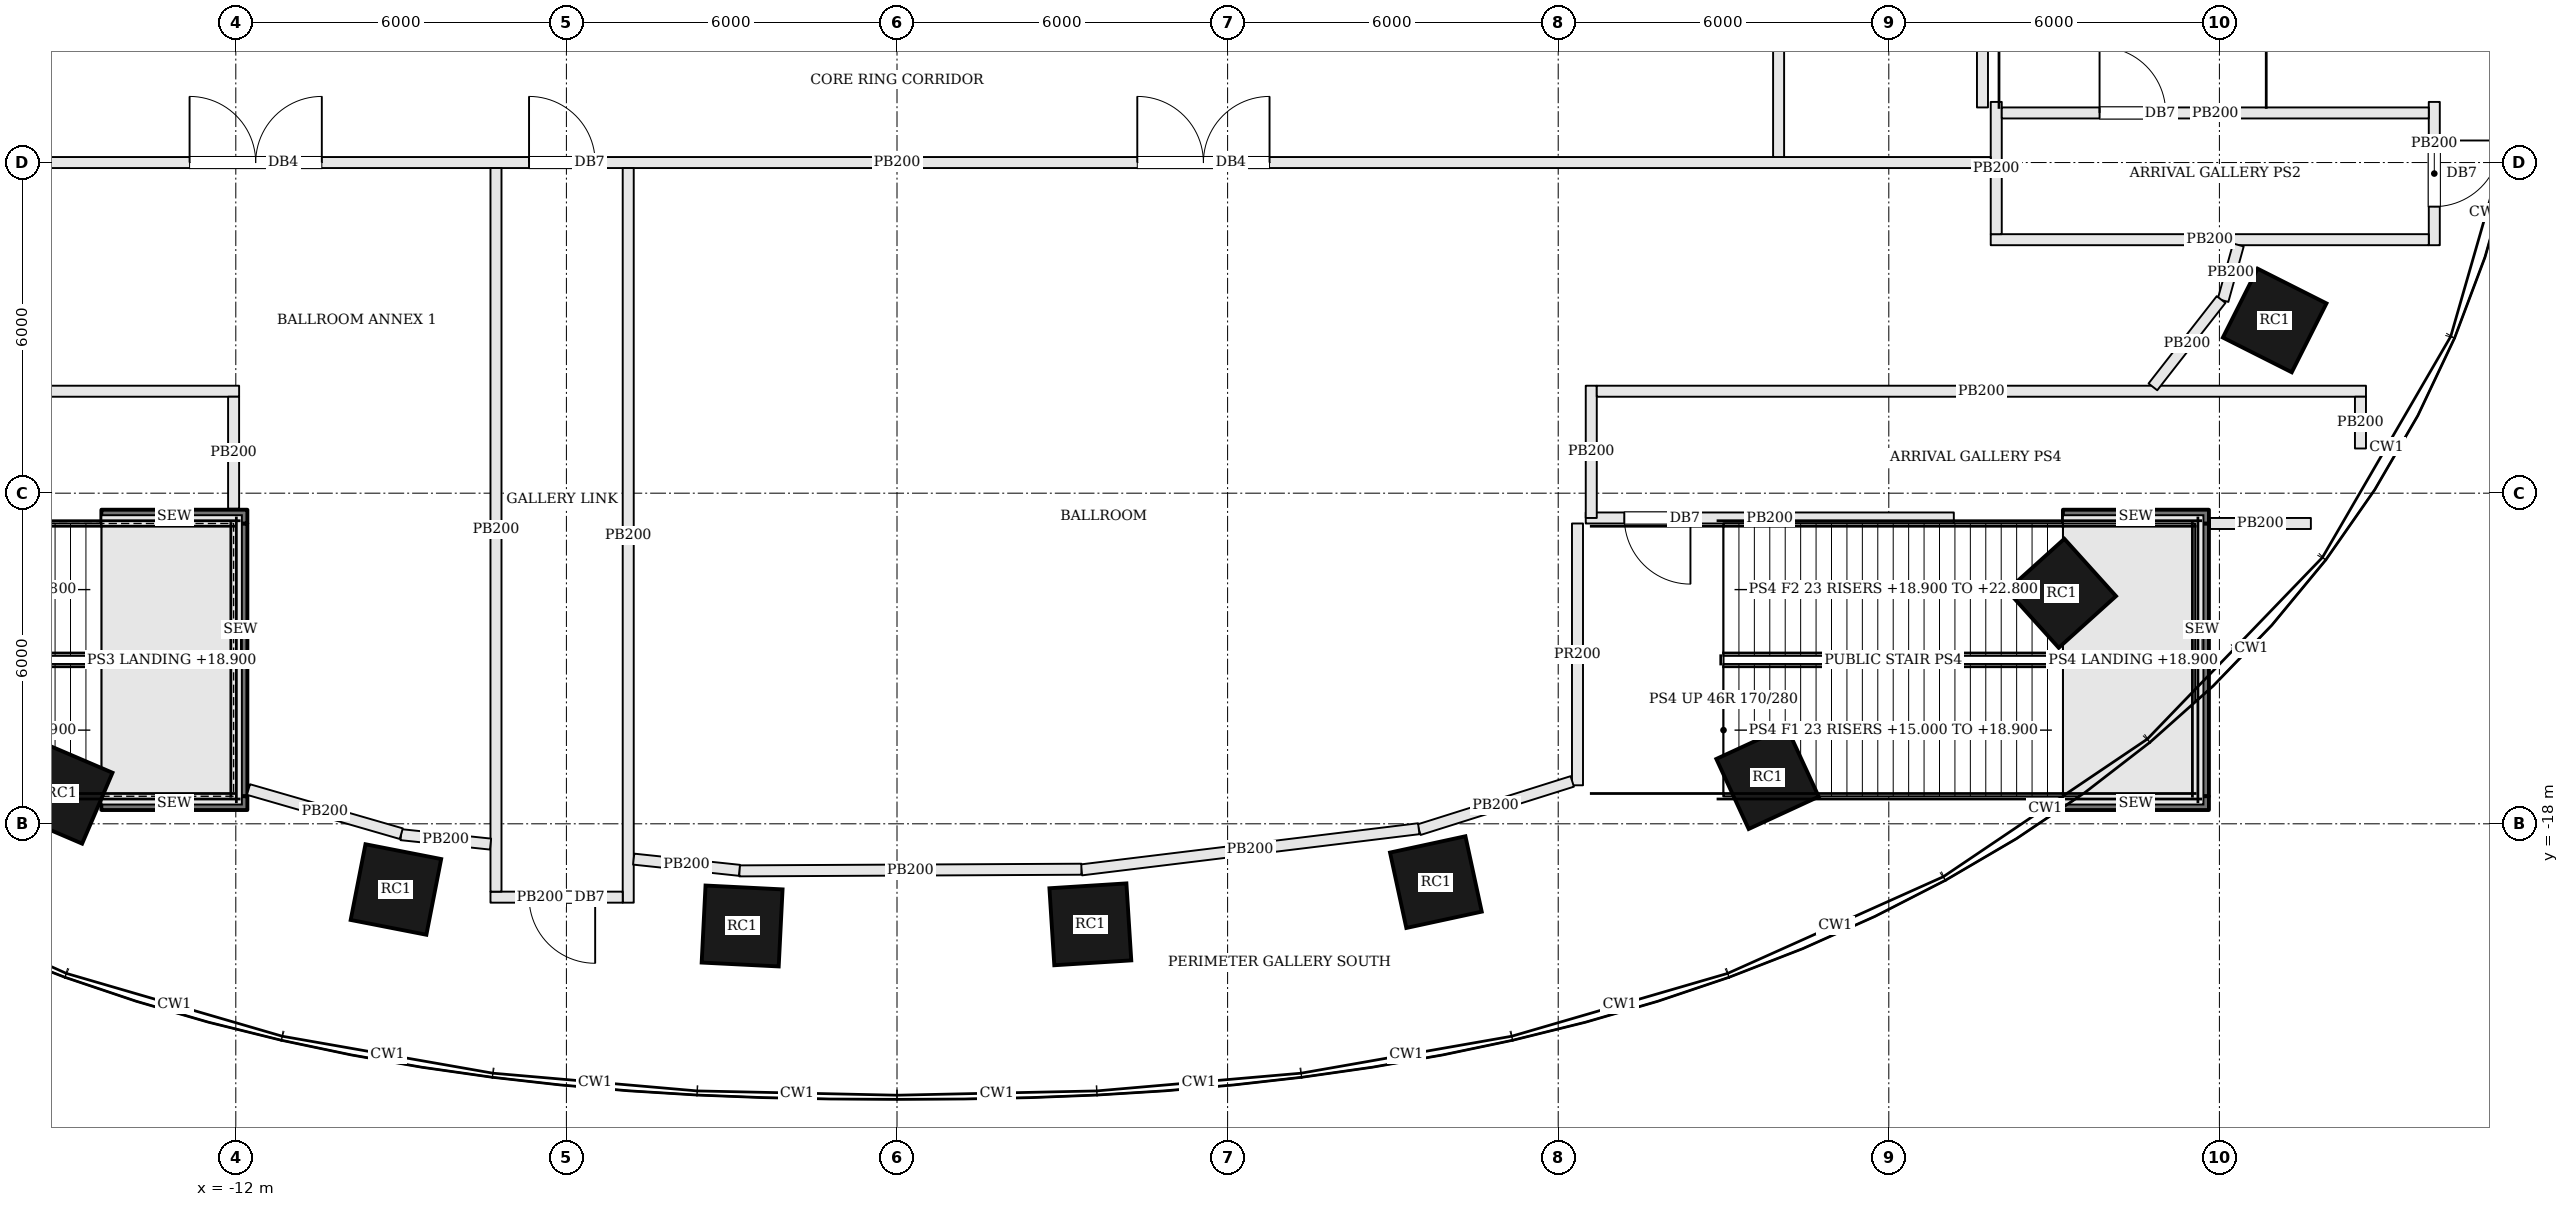
"""IFC4 building model, lengths in metres.
Left out: names, types, materials, properties, quantities, classifications, styles, units other than length and angle.
Written with IfcOpenShell. Run it as: python <this file> out.ifc"""

import sys

from ifc_helpers import new_model, si_unit, direction, frame, frame_2d, origin, origin_2d, place, context, subcontext, project, spatial, rectangle, extrude, element, fill, save


model = new_model("IFC4")
c1 = context("Model", 3, precision=1e-05, world=origin(), true_north=direction((0.0, 1.0)))
c2 = subcontext(c1, "Body", "Model", "MODEL_VIEW")
j1 = project(units=[si_unit("LENGTHUNIT", "METRE"), si_unit("PLANEANGLEUNIT", "RADIAN")], contexts=[c1])
p1 = place(None, origin())
s1 = spatial("IfcSite", under=j1, at=p1, CompositionType="ELEMENT")
p2 = place(p1, origin())
s2 = spatial("IfcBuilding", under=s1, at=p2, CompositionType="ELEMENT")
p3 = place(p2, frame((0.0, 0.0, 15.0)))
s3 = spatial("IfcBuildingStorey", under=s2, at=p3, CompositionType="ELEMENT", Elevation=15.0)
for number, where, z_axis, x_axis in (
    (1, (-15.157, -17.441, 0.0), (0.0, 0.0, 1.0), (0.919, -0.394, 0.0)),
    (2, (-9.094, -19.192, 0.0), (0.0, 0.0, 1.0), (0.981, -0.192, 0.0)),
    (3, (-2.811, -19.854, 0.0), (0.0, 0.0, 1.0), (0.999, -0.05, 0.0)),
    (4, (3.509, -19.824, 0.0), (0.0, 0.0, 1.0), (0.998, 0.063, 0.0)),
    (5, (9.78, -19.058, 0.0), (0.0, 0.0, 1.0), (0.977, 0.211, 0.0)),
    (6, (15.799, -17.165, 0.0), (0.0, 0.0, 1.0), (0.908, 0.419, 0.0)),
    (7, (21.135, -13.817, 0.0), (0.0, 0.0, 1.0), (0.743, 0.67, 0.0)),
    (8, (25.003, -8.866, 0.0), (0.0, 0.0, 1.0), (0.45, 0.893, 0.0)),
):
    element("IfcColumn", number, at=place(p3, frame(where, z_axis=z_axis, x_axis=x_axis)), inside=s3, PredefinedType="COLUMN", context=c2, shape_type="SweptSolid", body=[
        extrude(rectangle(XDim=1.4, YDim=1.4, at=origin_2d()), origin(), (0.0, 0.0, 1.0), 7.8),
    ])
p4 = place(p3, frame((27.9, -4.9, 0.0), z_axis=(0.0, 0.0, 1.0), x_axis=(0.0, -1.0, 0.0)))
e9 = element("IfcWall", 9, at=p4, inside=s3, PredefinedType="PARTITIONING", context=c2, shape_type="SweptSolid", body=[
    extrude(rectangle(XDim=2.6, YDim=0.2, at=frame_2d((1.3, 0.0))), origin(), (0.0, 0.0, 1.0), 6.83),
])
p5 = place(p4, frame((0.7, 0.0, 0.0)))
e10 = element("IfcOpeningElement", 10, at=p5, cuts=e9, PredefinedType="OPENING", context=c2, shape_type="SweptSolid", body=[
    extrude(rectangle(XDim=1.2, YDim=2.1, at=frame_2d((0.6, 1.05))), frame((0.0, 0.11, 0.0), z_axis=(0.0, -1.0, 0.0), x_axis=(1.0, 0.0, 0.0)), (0.0, 0.0, 1.0), 0.22),
])
p6 = place(p3, frame((27.8, -7.4, 0.0), z_axis=(0.0, 0.0, 1.0), x_axis=(-1.0, 0.0, 0.0)))
e11 = element("IfcWall", 11, at=p6, inside=s3, PredefinedType="PARTITIONING", context=c2, shape_type="SweptSolid", body=[
    extrude(rectangle(XDim=7.95, YDim=0.2, at=frame_2d((3.975, 0.0))), origin(), (0.0, 0.0, 1.0), 6.83),
])
p7 = place(p3, frame((19.95, -7.3, 0.0), z_axis=(0.0, 0.0, 1.0), x_axis=(0.0, 1.0, 0.0)))
e12 = element("IfcWall", 12, at=p7, inside=s3, PredefinedType="PARTITIONING", context=c2, shape_type="SweptSolid", body=[
    extrude(rectangle(XDim=2.4, YDim=0.2, at=frame_2d((1.2, 0.0))), origin(), (0.0, 0.0, 1.0), 6.83),
])
p8 = place(p3, frame((20.05, -5.1, 0.0), z_axis=(0.0, 0.0, 1.0), x_axis=(1.0, 0.0, 0.0)))
e13 = element("IfcWall", 13, at=p8, inside=s3, PredefinedType="PARTITIONING", context=c2, shape_type="SweptSolid", body=[
    extrude(rectangle(XDim=7.75, YDim=0.2, at=frame_2d((3.875, 0.0))), origin(), (0.0, 0.0, 1.0), 6.83),
])
p9 = place(p8, frame((1.775, 0.0, 0.0)))
e14 = element("IfcOpeningElement", 14, at=p9, cuts=e13, PredefinedType="OPENING", context=c2, shape_type="SweptSolid", body=[
    extrude(rectangle(XDim=1.2, YDim=2.1, at=frame_2d((0.6, 1.05))), frame((0.0, 0.11, 0.0), z_axis=(0.0, -1.0, 0.0), x_axis=(1.0, 0.0, 0.0)), (0.0, 0.0, 1.0), 0.22),
])
p10 = place(p3, frame((-23.826, -10.15, 0.0), z_axis=(0.0, 0.0, 1.0), x_axis=(1.0, 0.0, 0.0)))
e15 = element("IfcWall", 15, at=p10, inside=s3, PredefinedType="PARTITIONING", context=c2, shape_type="SweptSolid", body=[
    extrude(rectangle(XDim=11.886, YDim=0.2, at=frame_2d((5.943, 0.0))), origin(), (0.0, 0.0, 1.0), 6.83),
])
p11 = place(p3, frame((-12.04, -10.25, 0.0), z_axis=(0.0, 0.0, 1.0), x_axis=(0.0, -1.0, 0.0)))
e16 = element("IfcWall", 16, at=p11, inside=s3, PredefinedType="PARTITIONING", context=c2, shape_type="SweptSolid", body=[
    extrude(rectangle(XDim=2.03, YDim=0.2, at=frame_2d((1.015, 0.0))), origin(), (0.0, 0.0, 1.0), 6.83),
])
p12 = place(p3, frame((25.66, -12.55, 0.0), z_axis=(0.0, 0.0, 1.0), x_axis=(-1.0, 0.0, 0.0)))
e17 = element("IfcWall", 17, at=p12, inside=s3, PredefinedType="PARTITIONING", context=c2, shape_type="SweptSolid", body=[
    extrude(rectangle(XDim=1.83, YDim=0.2, at=frame_2d((0.915, 0.0))), origin(), (0.0, 0.0, 1.0), 6.83),
])
p13 = place(p3, frame((19.18, -12.45, 0.0), z_axis=(0.0, 0.0, 1.0), x_axis=(-1.0, 0.0, 0.0)))
e18 = element("IfcWall", 18, at=p13, inside=s3, PredefinedType="PARTITIONING", context=c2, shape_type="SweptSolid", body=[
    extrude(rectangle(XDim=6.68, YDim=0.2, at=frame_2d((3.34, 0.0))), origin(), (0.0, 0.0, 1.0), 6.83),
])
p14 = place(p13, frame((4.78, 0.0, 0.0)))
e19 = element("IfcOpeningElement", 19, at=p14, cuts=e18, PredefinedType="OPENING", context=c2, shape_type="SweptSolid", body=[
    extrude(rectangle(XDim=1.2, YDim=2.1, at=frame_2d((0.6, 1.05))), frame((0.0, 0.11, 0.0), z_axis=(0.0, -1.0, 0.0), x_axis=(1.0, 0.0, 0.0)), (0.0, 0.0, 1.0), 0.22),
])
p15 = place(p3, frame((12.6, -12.45, 0.0), z_axis=(0.0, 0.0, 1.0), x_axis=(0.0, 1.0, 0.0)))
e20 = element("IfcWall", 20, at=p15, inside=s3, PredefinedType="PARTITIONING", context=c2, shape_type="SweptSolid", body=[
    extrude(rectangle(XDim=2.4, YDim=0.2, at=frame_2d((1.2, 0.0))), origin(), (0.0, 0.0, 1.0), 6.83),
])
p16 = place(p3, frame((12.7, -10.15, 0.0), z_axis=(0.0, 0.0, 1.0), x_axis=(1.0, 0.0, 0.0)))
e21 = element("IfcWall", 21, at=p16, inside=s3, PredefinedType="PARTITIONING", context=c2, shape_type="SweptSolid", body=[
    extrude(rectangle(XDim=13.96, YDim=0.2, at=frame_2d((6.98, 0.0))), origin(), (0.0, 0.0, 1.0), 6.83),
])
p17 = place(p3, frame((26.56, -10.25, 0.0), z_axis=(0.0, 0.0, 1.0), x_axis=(0.0, -1.0, 0.0)))
e22 = element("IfcWall", 22, at=p17, inside=s3, PredefinedType="PARTITIONING", context=c2, shape_type="SweptSolid", body=[
    extrude(rectangle(XDim=0.939, YDim=0.2, at=frame_2d((0.469, 0.0))), origin(), (0.0, 0.0, 1.0), 6.83),
])
p18 = place(p3, frame((-19.85, -6.0, 0.0), z_axis=(0.0, 0.0, 1.0), x_axis=(1.0, 0.0, 0.0)))
e23 = element("IfcWall", 23, at=p18, inside=s3, PredefinedType="PARTITIONING", context=c2, shape_type="SweptSolid", body=[
    extrude(rectangle(XDim=39.7, YDim=0.2, at=frame_2d((19.85, 0.0))), origin(), (0.0, 0.0, 1.0), 6.83),
])
p19 = place(p18, frame((13.172, 0.0, 0.0)))
e24 = element("IfcOpeningElement", 24, at=p19, cuts=e23, PredefinedType="OPENING", context=c2, shape_type="SweptSolid", body=[
    extrude(rectangle(XDim=1.2, YDim=2.1, at=frame_2d((0.6, 1.05))), frame((0.0, 0.11, 0.0), z_axis=(0.0, -1.0, 0.0), x_axis=(1.0, 0.0, 0.0)), (0.0, 0.0, 1.0), 0.22),
])
p20 = place(p18, frame((24.211, 0.0, 0.0)))
e25 = element("IfcOpeningElement", 25, at=p20, cuts=e23, PredefinedType="OPENING", context=c2, shape_type="SweptSolid", body=[
    extrude(rectangle(XDim=2.4, YDim=2.4, at=frame_2d((1.2, 1.2))), frame((0.0, 0.11, 0.0), z_axis=(0.0, -1.0, 0.0), x_axis=(1.0, 0.0, 0.0)), (0.0, 0.0, 1.0), 0.22),
])
p21 = place(p18, frame((7.011, 0.0, 0.0)))
e26 = element("IfcOpeningElement", 26, at=p21, cuts=e23, PredefinedType="OPENING", context=c2, shape_type="SweptSolid", body=[
    extrude(rectangle(XDim=2.4, YDim=2.4, at=frame_2d((1.2, 1.2))), frame((0.0, 0.11, 0.0), z_axis=(0.0, -1.0, 0.0), x_axis=(1.0, 0.0, 0.0)), (0.0, 0.0, 1.0), 0.22),
])
p22 = place(p3, frame((-4.878, -6.1, 0.0), z_axis=(0.0, 0.0, 1.0), x_axis=(0.0, -1.0, 0.0)))
e27 = element("IfcWall", 27, at=p22, inside=s3, PredefinedType="PARTITIONING", context=c2, shape_type="SweptSolid", body=[
    extrude(rectangle(XDim=13.331, YDim=0.2, at=frame_2d((6.666, 0.0))), origin(), (0.0, 0.0, 1.0), 6.83),
])
p23 = place(p3, frame((-4.978, -19.331, 0.0), z_axis=(0.0, 0.0, 1.0), x_axis=(-1.0, 0.0, 0.0)))
e28 = element("IfcWall", 28, at=p23, inside=s3, PredefinedType="PARTITIONING", context=c2, shape_type="SweptSolid", body=[
    extrude(rectangle(XDim=2.4, YDim=0.2, at=frame_2d((1.2, 0.0))), origin(), (0.0, 0.0, 1.0), 6.83),
])
p24 = place(p23, frame((0.5, 0.0, 0.0)))
e29 = element("IfcOpeningElement", 29, at=p24, cuts=e28, PredefinedType="OPENING", context=c2, shape_type="SweptSolid", body=[
    extrude(rectangle(XDim=1.2, YDim=2.1, at=frame_2d((0.6, 1.05))), frame((0.0, 0.11, 0.0), z_axis=(0.0, -1.0, 0.0), x_axis=(1.0, 0.0, 0.0)), (0.0, 0.0, 1.0), 0.22),
])
p25 = place(p3, frame((-7.278, -19.231, 0.0), z_axis=(0.0, 0.0, 1.0), x_axis=(0.0, 1.0, 0.0)))
e30 = element("IfcWall", 30, at=p25, inside=s3, PredefinedType="PARTITIONING", context=c2, shape_type="SweptSolid", body=[
    extrude(rectangle(XDim=13.131, YDim=0.2, at=frame_2d((6.565, 0.0))), origin(), (0.0, 0.0, 1.0), 6.83),
])
p26 = place(p3, frame((19.7, 1.58, 0.0), z_axis=(0.0, 0.0, 1.0), x_axis=(0.0, -1.0, 0.0)))
e31 = element("IfcWall", 31, at=p26, inside=s3, PredefinedType="PARTITIONING", context=c2, shape_type="SweptSolid", body=[
    extrude(rectangle(XDim=6.58, YDim=0.2, at=frame_2d((3.29, 0.0))), origin(), (0.0, 0.0, 1.0), 6.83),
])
p27 = place(p3, frame((16.0, -5.9, 0.0), z_axis=(0.0, 0.0, 1.0), x_axis=(0.0, 1.0, 0.0)))
e32 = element("IfcWall", 32, at=p27, inside=s3, PredefinedType="PARTITIONING", context=c2, shape_type="SweptSolid", body=[
    extrude(rectangle(XDim=21.792, YDim=0.2, at=frame_2d((10.896, 0.0))), origin(), (0.0, 0.0, 1.0), 6.83),
])
p28 = place(p27, frame((9.9, 0.0, 0.0)))
e33 = element("IfcOpeningElement", 33, at=p28, cuts=e32, PredefinedType="OPENING", context=c2, shape_type="SweptSolid", body=[
    extrude(rectangle(XDim=1.0, YDim=2.1, at=frame_2d((0.5, 1.05))), frame((0.0, 0.11, 0.0), z_axis=(0.0, -1.0, 0.0), x_axis=(1.0, 0.0, 0.0)), (0.0, 0.0, 1.0), 0.22),
])
p29 = place(p3, frame((24.345, -7.496, 0.0), z_axis=(0.0, 0.0, 1.0), x_axis=(-0.267089429493, -0.963671747357, 0.0)))
e34 = element("IfcWall", 34, at=p29, inside=s3, PredefinedType="PARTITIONING", context=c2, shape_type="SweptSolid", body=[
    extrude(rectangle(XDim=1.045, YDim=0.2, at=frame_2d((0.522, 0.0))), origin(), (0.0, 0.0, 1.0), 6.83),
])
p30 = place(p3, frame((24.031, -8.486, 0.0), z_axis=(0.0, 0.0, 1.0), x_axis=(-0.615578080386, -0.788075901768, 0.0)))
e35 = element("IfcWall", 35, at=p30, inside=s3, PredefinedType="PARTITIONING", context=c2, shape_type="SweptSolid", body=[
    extrude(rectangle(XDim=2.011, YDim=0.2, at=frame_2d((1.006, 0.0))), origin(), (0.0, 0.0, 1.0), 6.83),
])
p31 = place(p3, frame((12.35, -12.55, 0.0), z_axis=(0.0, 0.0, 1.0), x_axis=(0.0, -1.0, 0.0)))
e36 = element("IfcWall", 36, at=p31, inside=s3, PredefinedType="PARTITIONING", context=c2, shape_type="SweptSolid", body=[
    extrude(rectangle(XDim=4.751, YDim=0.2, at=frame_2d((2.375, 0.0))), origin(), (0.0, 0.0, 1.0), 6.934),
])
p32 = place(p3, frame((12.255, -17.231, 0.0), z_axis=(0.0, 0.0, 1.0), x_axis=(-0.953832821469, -0.300338057344, 0.0)))
e37 = element("IfcWall", 37, at=p32, inside=s3, PredefinedType="PARTITIONING", context=c2, shape_type="SweptSolid", body=[
    extrude(rectangle(XDim=2.917, YDim=0.2, at=frame_2d((1.458, 0.0))), origin(), (0.0, 0.0, 1.0), 6.83),
])
p33 = place(p3, frame((9.469, -18.089, 0.0), z_axis=(0.0, 0.0, 1.0), x_axis=(-0.992641352158, -0.121091477758, 0.0)))
e38 = element("IfcWall", 38, at=p33, inside=s3, PredefinedType="PARTITIONING", context=c2, shape_type="SweptSolid", body=[
    extrude(rectangle(XDim=6.167, YDim=0.2, at=frame_2d((3.084, 0.0))), origin(), (0.0, 0.0, 1.0), 6.83),
])
p34 = place(p3, frame((3.346, -18.824, 0.0), z_axis=(0.0, 0.0, 1.0), x_axis=(-0.999988297333, -0.004837891778, 0.0)))
e39 = element("IfcWall", 39, at=p34, inside=s3, PredefinedType="PARTITIONING", context=c2, shape_type="SweptSolid", body=[
    extrude(rectangle(XDim=6.207, YDim=0.2, at=frame_2d((3.104, 0.0))), origin(), (0.0, 0.0, 1.0), 6.83),
])
p35 = place(p3, frame((-2.86, -18.844, 0.0), z_axis=(0.0, 0.0, 1.0), x_axis=(-0.994457513639, 0.105139210412, 0.0)))
e40 = element("IfcWall", 40, at=p35, inside=s3, PredefinedType="PARTITIONING", context=c2, shape_type="SweptSolid", body=[
    extrude(rectangle(XDim=1.93, YDim=0.2, at=frame_2d((0.965, 0.0))), origin(), (0.0, 0.0, 1.0), 6.83),
])
p36 = place(p3, frame((-7.377, -18.368, 0.0), z_axis=(0.0, 0.0, 1.0), x_axis=(-0.994502173657, 0.104715932846, 0.0)))
e41 = element("IfcWall", 41, at=p36, inside=s3, PredefinedType="PARTITIONING", context=c2, shape_type="SweptSolid", body=[
    extrude(rectangle(XDim=1.632, YDim=0.2, at=frame_2d((0.816, 0.0))), origin(), (0.0, 0.0, 1.0), 6.83),
])
p37 = place(p3, frame((-8.997, -18.179, 0.0), z_axis=(0.0, 0.0, 1.0), x_axis=(-0.960718693411, 0.277524038834, 0.0)))
e42 = element("IfcWall", 42, at=p37, inside=s3, PredefinedType="PARTITIONING", context=c2, shape_type="SweptSolid", body=[
    extrude(rectangle(XDim=2.886, YDim=0.2, at=frame_2d((1.443, 0.0))), origin(), (0.0, 0.0, 1.0), 6.83),
])
p38 = place(p3, frame((-11.915, -17.5, 0.0), z_axis=(0.0, 0.0, 1.0), x_axis=(0.0, 1.0, 0.0)))
e43 = element("IfcWall", 43, at=p38, inside=s3, PredefinedType="SOLIDWALL", context=c2, shape_type="SweptSolid", body=[
    extrude(rectangle(XDim=4.95, YDim=0.25, at=frame_2d((2.475, 0.0))), origin(), (0.0, 0.0, 1.0), 7.55),
])
for number, where, z_axis, x_axis in (
    (44, (-14.44, -17.625, 0.0), (0.0, 0.0, 1.0), (1.0, 0.0, 0.0)),
    (45, (-14.44, -12.425, 0.0), (0.0, 0.0, 1.0), (1.0, 0.0, 0.0)),
):
    element("IfcWall", number, at=place(p3, frame(where, z_axis=z_axis, x_axis=x_axis)), inside=s3, PredefinedType="SOLIDWALL", context=c2, shape_type="SweptSolid", body=[
        extrude(rectangle(XDim=2.65, YDim=0.25, at=frame_2d((1.325, 0.0))), origin(), (0.0, 0.0, 1.0), 7.55),
    ])
p39 = place(p3, frame((23.685, -17.5, 0.0), z_axis=(0.0, 0.0, 1.0), x_axis=(0.0, 1.0, 0.0)))
e46 = element("IfcWall", 46, at=p39, inside=s3, PredefinedType="SOLIDWALL", context=c2, shape_type="SweptSolid", body=[
    extrude(rectangle(XDim=4.95, YDim=0.25, at=frame_2d((2.475, 0.0))), origin(), (0.0, 0.0, 1.0), 7.55),
])
for number, where, z_axis, x_axis in (
    (47, (21.16, -17.625, 0.0), (0.0, 0.0, 1.0), (1.0, 0.0, 0.0)),
    (48, (21.16, -12.425, 0.0), (0.0, 0.0, 1.0), (1.0, 0.0, 0.0)),
):
    element("IfcWall", number, at=place(p3, frame(where, z_axis=z_axis, x_axis=x_axis)), inside=s3, PredefinedType="SOLIDWALL", context=c2, shape_type="SweptSolid", body=[
        extrude(rectangle(XDim=2.65, YDim=0.25, at=frame_2d((1.325, 0.0))), origin(), (0.0, 0.0, 1.0), 7.55),
    ])
p40 = place(p19, origin())
e49 = element("IfcDoor", 49, at=p40, inside=s3, OperationType="SINGLE_SWING_LEFT", PredefinedType="DOOR", context=c2, shape_type="SweptSolid", body=[
    extrude(rectangle(XDim=1.2, YDim=2.1, at=frame_2d((0.6, 1.05))), frame((0.0, 0.025, 0.0), z_axis=(0.0, -1.0, 0.0), x_axis=(1.0, 0.0, 0.0)), (0.0, 0.0, 1.0), 0.05),
])
fill(e24, e49)
p41 = place(p24, origin())
e50 = element("IfcDoor", 50, at=p41, inside=s3, OperationType="SINGLE_SWING_LEFT", PredefinedType="DOOR", context=c2, shape_type="SweptSolid", body=[
    extrude(rectangle(XDim=1.2, YDim=2.1, at=frame_2d((0.6, 1.05))), frame((0.0, 0.025, 0.0), z_axis=(0.0, -1.0, 0.0), x_axis=(1.0, 0.0, 0.0)), (0.0, 0.0, 1.0), 0.05),
])
fill(e29, e50)
p42 = place(p9, origin())
e51 = element("IfcDoor", 51, at=p42, inside=s3, OperationType="SINGLE_SWING_LEFT", PredefinedType="DOOR", context=c2, shape_type="SweptSolid", body=[
    extrude(rectangle(XDim=1.2, YDim=2.1, at=frame_2d((0.6, 1.05))), frame((0.0, 0.025, 0.0), z_axis=(0.0, -1.0, 0.0), x_axis=(1.0, 0.0, 0.0)), (0.0, 0.0, 1.0), 0.05),
])
fill(e14, e51)
p43 = place(p5, origin())
e52 = element("IfcDoor", 52, at=p43, inside=s3, OperationType="SINGLE_SWING_LEFT", PredefinedType="DOOR", context=c2, shape_type="SweptSolid", body=[
    extrude(rectangle(XDim=1.2, YDim=2.1, at=frame_2d((0.6, 1.05))), frame((0.0, 0.025, 0.0), z_axis=(0.0, -1.0, 0.0), x_axis=(1.0, 0.0, 0.0)), (0.0, 0.0, 1.0), 0.05),
])
fill(e10, e52)
p44 = place(p14, origin())
e53 = element("IfcDoor", 53, at=p44, inside=s3, OperationType="SINGLE_SWING_LEFT", PredefinedType="DOOR", context=c2, shape_type="SweptSolid", body=[
    extrude(rectangle(XDim=1.2, YDim=2.1, at=frame_2d((0.6, 1.05))), frame((0.0, 0.025, 0.0), z_axis=(0.0, -1.0, 0.0), x_axis=(1.0, 0.0, 0.0)), (0.0, 0.0, 1.0), 0.05),
])
fill(e19, e53)
p45 = place(p20, origin())
e54 = element("IfcDoor", 54, at=p45, inside=s3, OperationType="DOUBLE_DOOR_SINGLE_SWING", PredefinedType="DOOR", context=c2, shape_type="SweptSolid", body=[
    extrude(rectangle(XDim=2.4, YDim=2.4, at=frame_2d((1.2, 1.2))), frame((0.0, 0.025, 0.0), z_axis=(0.0, -1.0, 0.0), x_axis=(1.0, 0.0, 0.0)), (0.0, 0.0, 1.0), 0.05),
])
fill(e25, e54)
p46 = place(p21, origin())
e55 = element("IfcDoor", 55, at=p46, inside=s3, OperationType="DOUBLE_DOOR_SINGLE_SWING", PredefinedType="DOOR", context=c2, shape_type="SweptSolid", body=[
    extrude(rectangle(XDim=2.4, YDim=2.4, at=frame_2d((1.2, 1.2))), frame((0.0, 0.025, 0.0), z_axis=(0.0, -1.0, 0.0), x_axis=(1.0, 0.0, 0.0)), (0.0, 0.0, 1.0), 0.05),
])
fill(e26, e55)
save(model, sys.argv[1])
